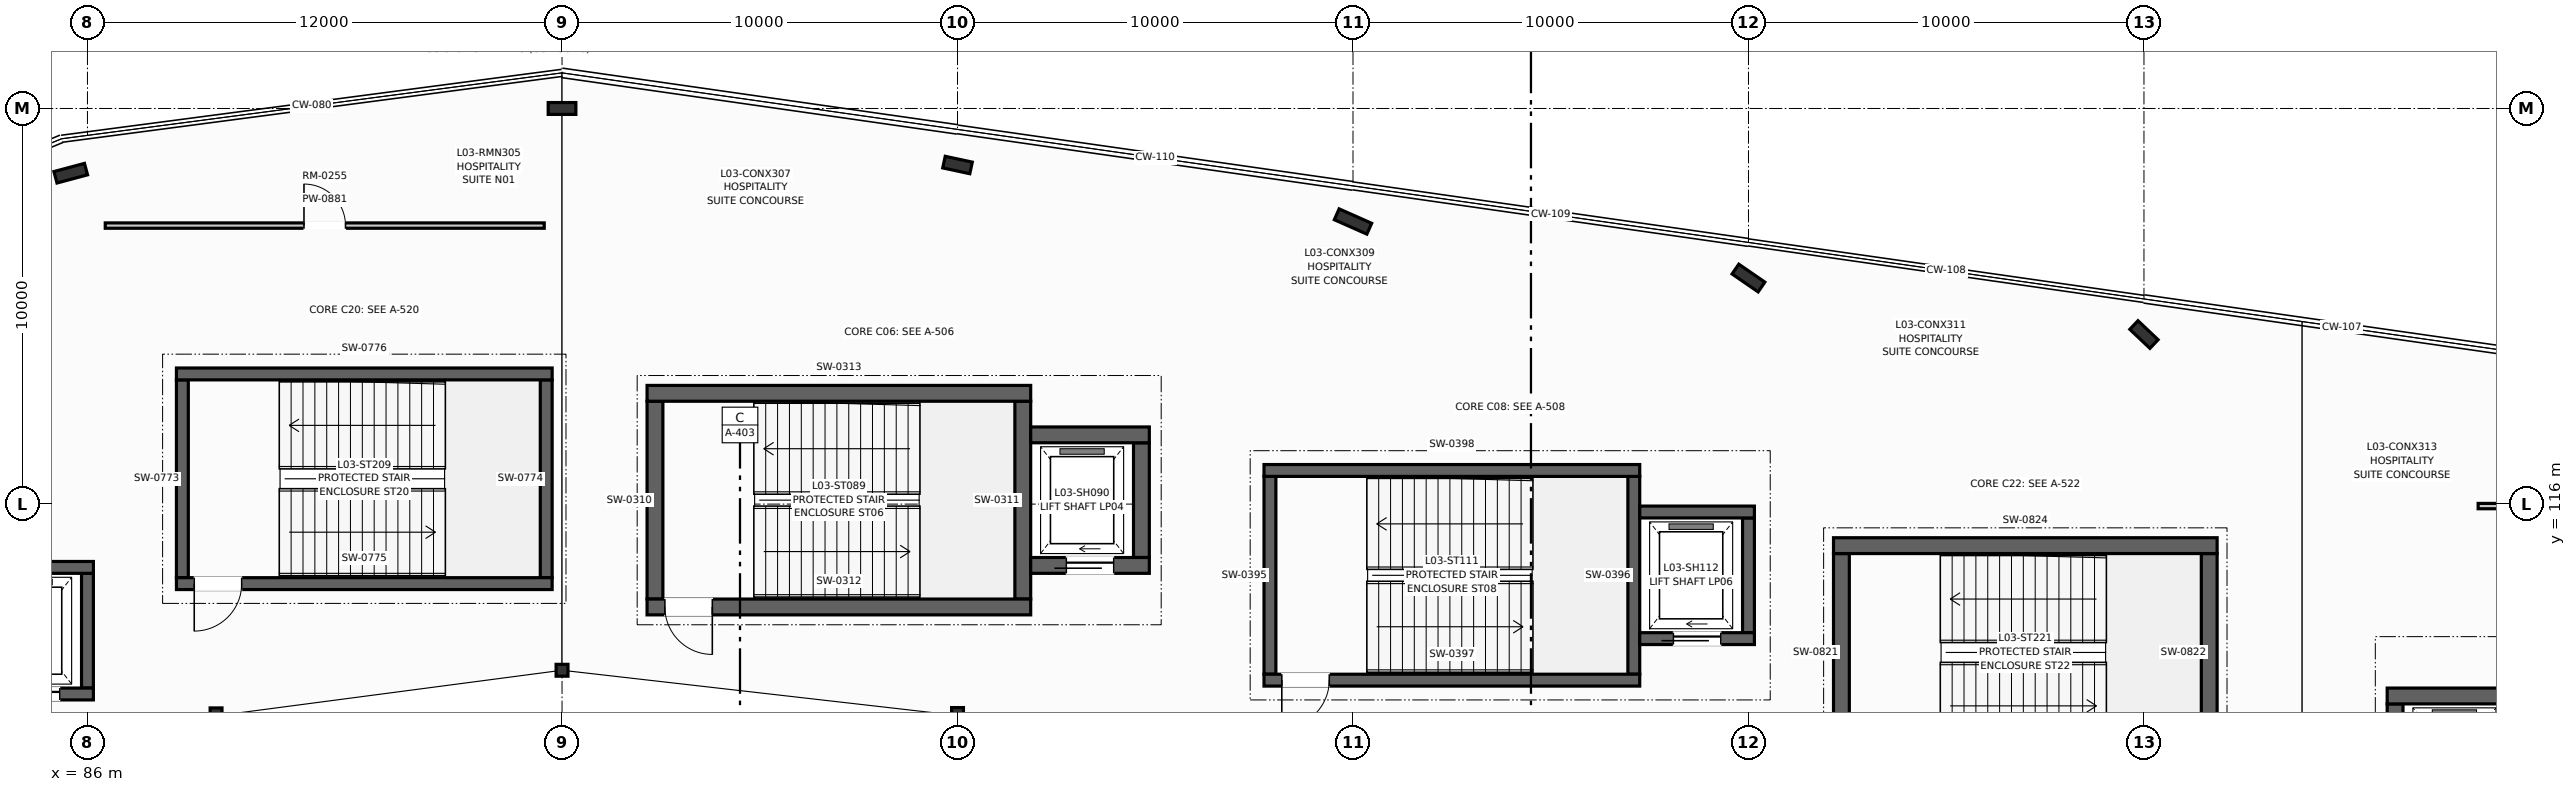
"""IFC4 building model, lengths in metres.
Left out: names, types, materials, properties, quantities, classifications, styles, units other than length and angle.
Written with IfcOpenShell. Run it as: python <this file> out.ifc"""

import sys

from ifc_helpers import new_model, si_unit, direction, frame, frame_2d, origin, origin_2d, place, context, subcontext, project, spatial, rectangle, i_section, extrude, element, fill, save


model = new_model("IFC4")
c1 = context("Model", 3, precision=1e-05, world=origin(), true_north=direction((0.0, 1.0)))
c2 = subcontext(c1, "Body", "Model", "MODEL_VIEW")
j1 = project(units=[si_unit("LENGTHUNIT", "METRE"), si_unit("PLANEANGLEUNIT", "RADIAN")], contexts=[c1])
p1 = place(None, origin())
s1 = spatial("IfcSite", under=j1, at=p1, CompositionType="ELEMENT")
p2 = place(p1, origin())
s2 = spatial("IfcBuilding", under=s1, at=p2, CompositionType="ELEMENT")
p3 = place(p2, frame((0.0, 0.0, 13.5)))
s3 = spatial("IfcBuildingStorey", under=s2, at=p3, CompositionType="ELEMENT", Elevation=13.5)
p4 = place(p3, frame((98.0, 111.8, 0.0), z_axis=(0.0, 0.0, 1.0), x_axis=(1.0, 0.0, 0.0)))
e1 = element("IfcColumn", 1, at=p4, inside=s3, PredefinedType="COLUMN", context=c2, shape_type="SweptSolid", body=[
    extrude(i_section(OverallWidth=0.3, OverallDepth=0.3, WebThickness=0.011, FlangeThickness=0.019, at=origin_2d()), origin(), (0.0, 0.0, 1.0), 4.5),
])
for number, where, z_axis, x_axis in (
    (2, (89.252, 110.648, 0.0), (0.0, 0.0, 1.0), (1.0, 0.0, 0.0)),
    (3, (108.0, 110.657, 0.0), (0.0, 0.0, 1.0), (1.0, 0.0, 0.0)),
):
    element("IfcColumn", number, at=place(p3, frame(where, z_axis=z_axis, x_axis=x_axis)), inside=s3, PredefinedType="COLUMN", context=c2, shape_type="SweptSolid", body=[
        extrude(i_section(OverallWidth=0.3, OverallDepth=0.4, WebThickness=0.013, FlangeThickness=0.024, at=origin_2d()), origin(), (0.0, 0.0, 1.0), 4.5),
    ])
p5 = place(p3, frame((98.0, 126.0, 0.0), z_axis=(0.0, 0.0, 1.0), x_axis=(0.0, 1.0, 0.0)))
e4 = element("IfcColumn", 4, at=p5, inside=s3, PredefinedType="COLUMN", context=c2, shape_type="SweptSolid", body=[
    extrude(i_section(OverallWidth=0.3, OverallDepth=0.7, WebThickness=0.017, FlangeThickness=0.032, at=origin_2d()), origin(), (0.0, 0.0, 1.0), 4.5),
])
p6 = place(p3, frame((85.577, 124.364, 0.0), z_axis=(0.0, 0.0, 1.0), x_axis=(-0.258819045103, 0.965925826289, 0.0)))
e5 = element("IfcColumn", 5, at=p6, inside=s3, PredefinedType="COLUMN", context=c2, shape_type="SweptSolid", body=[
    extrude(i_section(OverallWidth=0.3, OverallDepth=0.8, WebThickness=0.018, FlangeThickness=0.033, at=origin_2d()), origin(), (0.0, 0.0, 1.0), 4.5),
])
p7 = place(p3, frame((138.0, 120.286, 0.0), z_axis=(0.0, 0.0, 1.0), x_axis=(0.687087510804, 0.726574670971, 0.0)))
e6 = element("IfcColumn", 6, at=p7, inside=s3, PredefinedType="COLUMN", context=c2, shape_type="SweptSolid", body=[
    extrude(i_section(OverallWidth=0.3, OverallDepth=0.7, WebThickness=0.017, FlangeThickness=0.032, at=origin_2d()), origin(), (0.0, 0.0, 1.0), 4.5),
])
p8 = place(p3, frame((128.0, 121.714, 0.0), z_axis=(0.0, 0.0, 1.0), x_axis=(0.566406236925, 0.824126188622, 0.0)))
e7 = element("IfcColumn", 7, at=p8, inside=s3, PredefinedType="COLUMN", context=c2, shape_type="SweptSolid", body=[
    extrude(i_section(OverallWidth=0.3, OverallDepth=0.8, WebThickness=0.018, FlangeThickness=0.033, at=origin_2d()), origin(), (0.0, 0.0, 1.0), 4.5),
])
p9 = place(p3, frame((118.0, 123.143, 0.0), z_axis=(0.0, 0.0, 1.0), x_axis=(0.40514158678, 0.914253955234, 0.0)))
e8 = element("IfcColumn", 8, at=p9, inside=s3, PredefinedType="COLUMN", context=c2, shape_type="SweptSolid", body=[
    extrude(i_section(OverallWidth=0.3, OverallDepth=0.9, WebThickness=0.019, FlangeThickness=0.035, at=origin_2d()), origin(), (0.0, 0.0, 1.0), 4.5),
])
p10 = place(p3, frame((108.0, 124.571, 0.0), z_axis=(0.0, 0.0, 1.0), x_axis=(0.209618562904, 0.977783236759, 0.0)))
e9 = element("IfcColumn", 9, at=p10, inside=s3, PredefinedType="COLUMN", context=c2, shape_type="SweptSolid", body=[
    extrude(i_section(OverallWidth=0.3, OverallDepth=0.7, WebThickness=0.017, FlangeThickness=0.032, at=origin_2d()), origin(), (0.0, 0.0, 1.0), 4.5),
])
p11 = place(p3, frame((86.0, 111.35, 0.0), z_axis=(0.0, 0.0, 1.0), x_axis=(0.0, 1.0, 0.0)))
e10 = element("IfcWall", 10, at=p11, inside=s3, PredefinedType="SHEAR", context=c2, shape_type="SweptSolid", body=[
    extrude(rectangle(XDim=2.9, YDim=0.3, at=frame_2d((1.45, 0.0))), origin(), (0.0, 0.0, 1.0), 4.25),
])
p12 = place(p3, frame((83.25, 111.2, 0.0), z_axis=(0.0, 0.0, 1.0), x_axis=(1.0, 0.0, 0.0)))
e11 = element("IfcWall", 11, at=p12, inside=s3, PredefinedType="SHEAR", context=c2, shape_type="SweptSolid", body=[
    extrude(rectangle(XDim=2.9, YDim=0.3, at=frame_2d((1.45, 0.0))), origin(), (0.0, 0.0, 1.0), 4.25),
])
p13 = place(p12, frame((0.85, 0.0, 0.0)))
e12 = element("IfcOpeningElement", 12, at=p13, cuts=e11, PredefinedType="OPENING", context=c2, shape_type="SweptSolid", body=[
    extrude(rectangle(XDim=1.2, YDim=2.2, at=frame_2d((0.6, 1.1))), frame((0.0, 0.16, 0.0), z_axis=(0.0, -1.0, 0.0), x_axis=(1.0, 0.0, 0.0)), (0.0, 0.0, 1.0), 0.32),
])
p14 = place(p3, frame((83.25, 114.4, 0.0), z_axis=(0.0, 0.0, 1.0), x_axis=(1.0, 0.0, 0.0)))
e13 = element("IfcWall", 13, at=p14, inside=s3, PredefinedType="SHEAR", context=c2, shape_type="SweptSolid", body=[
    extrude(rectangle(XDim=2.9, YDim=0.3, at=frame_2d((1.45, 0.0))), origin(), (0.0, 0.0, 1.0), 4.25),
])
for number, where, z_axis, x_axis in (
    (14, (100.35, 113.6, 0.0), (0.0, 0.0, 1.0), (0.0, 1.0, 0.0)),
    (15, (109.65, 113.6, 0.0), (0.0, 0.0, 1.0), (0.0, 1.0, 0.0)),
):
    element("IfcWall", number, at=place(p3, frame(where, z_axis=z_axis, x_axis=x_axis)), inside=s3, PredefinedType="SHEAR", context=c2, shape_type="SweptSolid", body=[
        extrude(rectangle(XDim=5.0, YDim=0.4, at=frame_2d((2.5, 0.0))), origin(), (0.0, 0.0, 1.0), 4.25),
    ])
p15 = place(p3, frame((100.15, 113.4, 0.0), z_axis=(0.0, 0.0, 1.0), x_axis=(1.0, 0.0, 0.0)))
e16 = element("IfcWall", 16, at=p15, inside=s3, PredefinedType="SHEAR", context=c2, shape_type="SweptSolid", body=[
    extrude(rectangle(XDim=9.7, YDim=0.4, at=frame_2d((4.85, 0.0))), origin(), (0.0, 0.0, 1.0), 4.25),
])
p16 = place(p15, frame((0.45, 0.0, 0.0)))
e17 = element("IfcOpeningElement", 17, at=p16, cuts=e16, PredefinedType="OPENING", context=c2, shape_type="SweptSolid", body=[
    extrude(rectangle(XDim=1.2, YDim=2.2, at=frame_2d((0.6, 1.1))), frame((0.0, 0.21, 0.0), z_axis=(0.0, -1.0, 0.0), x_axis=(1.0, 0.0, 0.0)), (0.0, 0.0, 1.0), 0.42),
])
p17 = place(p3, frame((100.15, 118.8, 0.0), z_axis=(0.0, 0.0, 1.0), x_axis=(1.0, 0.0, 0.0)))
e18 = element("IfcWall", 18, at=p17, inside=s3, PredefinedType="SHEAR", context=c2, shape_type="SweptSolid", body=[
    extrude(rectangle(XDim=9.7, YDim=0.4, at=frame_2d((4.85, 0.0))), origin(), (0.0, 0.0, 1.0), 4.25),
])
p18 = place(p3, frame((112.65, 114.65, 0.0), z_axis=(0.0, 0.0, 1.0), x_axis=(0.0, 1.0, 0.0)))
e19 = element("IfcWall", 19, at=p18, inside=s3, PredefinedType="SHEAR", context=c2, shape_type="SweptSolid", body=[
    extrude(rectangle(XDim=2.9, YDim=0.4, at=frame_2d((1.45, 0.0))), origin(), (0.0, 0.0, 1.0), 4.25),
])
p19 = place(p3, frame((109.85, 114.45, 0.0), z_axis=(0.0, 0.0, 1.0), x_axis=(1.0, 0.0, 0.0)))
e20 = element("IfcWall", 20, at=p19, inside=s3, PredefinedType="SHEAR", context=c2, shape_type="SweptSolid", body=[
    extrude(rectangle(XDim=3.0, YDim=0.4, at=frame_2d((1.5, 0.0))), origin(), (0.0, 0.0, 1.0), 4.25),
])
p20 = place(p19, frame((0.9, 0.0, 0.0)))
e21 = element("IfcOpeningElement", 21, at=p20, cuts=e20, PredefinedType="OPENING", context=c2, shape_type="SweptSolid", body=[
    extrude(rectangle(XDim=1.2, YDim=2.2, at=frame_2d((0.6, 1.1))), frame((0.0, 0.21, 0.0), z_axis=(0.0, -1.0, 0.0), x_axis=(1.0, 0.0, 0.0)), (0.0, 0.0, 1.0), 0.42),
])
p21 = place(p3, frame((109.85, 117.75, 0.0), z_axis=(0.0, 0.0, 1.0), x_axis=(1.0, 0.0, 0.0)))
e22 = element("IfcWall", 22, at=p21, inside=s3, PredefinedType="SHEAR", context=c2, shape_type="SweptSolid", body=[
    extrude(rectangle(XDim=3.0, YDim=0.4, at=frame_2d((1.5, 0.0))), origin(), (0.0, 0.0, 1.0), 4.25),
])
for number, where, z_axis, x_axis in (
    (23, (115.9, 111.7, 0.0), (0.0, 0.0, 1.0), (0.0, 1.0, 0.0)),
    (24, (125.1, 111.7, 0.0), (0.0, 0.0, 1.0), (0.0, 1.0, 0.0)),
):
    element("IfcWall", number, at=place(p3, frame(where, z_axis=z_axis, x_axis=x_axis)), inside=s3, PredefinedType="SHEAR", context=c2, shape_type="SweptSolid", body=[
        extrude(rectangle(XDim=5.0, YDim=0.3, at=frame_2d((2.5, 0.0))), origin(), (0.0, 0.0, 1.0), 4.25),
    ])
p22 = place(p3, frame((115.75, 111.55, 0.0), z_axis=(0.0, 0.0, 1.0), x_axis=(1.0, 0.0, 0.0)))
e25 = element("IfcWall", 25, at=p22, inside=s3, PredefinedType="SHEAR", context=c2, shape_type="SweptSolid", body=[
    extrude(rectangle(XDim=9.5, YDim=0.3, at=frame_2d((4.75, 0.0))), origin(), (0.0, 0.0, 1.0), 4.25),
])
p23 = place(p22, frame((0.45, 0.0, 0.0)))
e26 = element("IfcOpeningElement", 26, at=p23, cuts=e25, PredefinedType="OPENING", context=c2, shape_type="SweptSolid", body=[
    extrude(rectangle(XDim=1.2, YDim=2.2, at=frame_2d((0.6, 1.1))), frame((0.0, 0.16, 0.0), z_axis=(0.0, -1.0, 0.0), x_axis=(1.0, 0.0, 0.0)), (0.0, 0.0, 1.0), 0.32),
])
p24 = place(p3, frame((115.75, 116.85, 0.0), z_axis=(0.0, 0.0, 1.0), x_axis=(1.0, 0.0, 0.0)))
e27 = element("IfcWall", 27, at=p24, inside=s3, PredefinedType="SHEAR", context=c2, shape_type="SweptSolid", body=[
    extrude(rectangle(XDim=9.5, YDim=0.3, at=frame_2d((4.75, 0.0))), origin(), (0.0, 0.0, 1.0), 4.25),
])
p25 = place(p3, frame((128.0, 112.75, 0.0), z_axis=(0.0, 0.0, 1.0), x_axis=(0.0, 1.0, 0.0)))
e28 = element("IfcWall", 28, at=p25, inside=s3, PredefinedType="SHEAR", context=c2, shape_type="SweptSolid", body=[
    extrude(rectangle(XDim=2.9, YDim=0.3, at=frame_2d((1.45, 0.0))), origin(), (0.0, 0.0, 1.0), 4.25),
])
p26 = place(p3, frame((125.25, 112.6, 0.0), z_axis=(0.0, 0.0, 1.0), x_axis=(1.0, 0.0, 0.0)))
e29 = element("IfcWall", 29, at=p26, inside=s3, PredefinedType="SHEAR", context=c2, shape_type="SweptSolid", body=[
    extrude(rectangle(XDim=2.9, YDim=0.3, at=frame_2d((1.45, 0.0))), origin(), (0.0, 0.0, 1.0), 4.25),
])
p27 = place(p26, frame((0.85, 0.0, 0.0)))
e30 = element("IfcOpeningElement", 30, at=p27, cuts=e29, PredefinedType="OPENING", context=c2, shape_type="SweptSolid", body=[
    extrude(rectangle(XDim=1.2, YDim=2.2, at=frame_2d((0.6, 1.1))), frame((0.0, 0.16, 0.0), z_axis=(0.0, -1.0, 0.0), x_axis=(1.0, 0.0, 0.0)), (0.0, 0.0, 1.0), 0.32),
])
p28 = place(p3, frame((125.25, 115.8, 0.0), z_axis=(0.0, 0.0, 1.0), x_axis=(1.0, 0.0, 0.0)))
e31 = element("IfcWall", 31, at=p28, inside=s3, PredefinedType="SHEAR", context=c2, shape_type="SweptSolid", body=[
    extrude(rectangle(XDim=2.9, YDim=0.3, at=frame_2d((1.45, 0.0))), origin(), (0.0, 0.0, 1.0), 4.25),
])
p29 = place(p3, frame((144.35, 108.05, 0.0), z_axis=(0.0, 0.0, 1.0), x_axis=(0.0, 1.0, 0.0)))
e32 = element("IfcWall", 32, at=p29, inside=s3, PredefinedType="SHEAR", context=c2, shape_type="SweptSolid", body=[
    extrude(rectangle(XDim=2.9, YDim=0.4, at=frame_2d((1.45, 0.0))), origin(), (0.0, 0.0, 1.0), 4.25),
])
p30 = place(p3, frame((144.15, 111.15, 0.0), z_axis=(0.0, 0.0, 1.0), x_axis=(1.0, 0.0, 0.0)))
e33 = element("IfcWall", 33, at=p30, inside=s3, PredefinedType="SHEAR", context=c2, shape_type="SweptSolid", body=[
    extrude(rectangle(XDim=3.0, YDim=0.4, at=frame_2d((1.5, 0.0))), origin(), (0.0, 0.0, 1.0), 4.25),
])
for number, where, z_axis, x_axis in (
    (34, (88.4, 114.14, 0.0), (0.0, 0.0, 1.0), (0.0, 1.0, 0.0)),
    (35, (97.6, 114.14, 0.0), (0.0, 0.0, 1.0), (0.0, 1.0, 0.0)),
):
    element("IfcWall", number, at=place(p3, frame(where, z_axis=z_axis, x_axis=x_axis)), inside=s3, PredefinedType="SHEAR", context=c2, shape_type="SweptSolid", body=[
        extrude(rectangle(XDim=5.0, YDim=0.3, at=frame_2d((2.5, 0.0))), origin(), (0.0, 0.0, 1.0), 4.25),
    ])
p31 = place(p3, frame((88.25, 113.99, 0.0), z_axis=(0.0, 0.0, 1.0), x_axis=(1.0, 0.0, 0.0)))
e36 = element("IfcWall", 36, at=p31, inside=s3, PredefinedType="SHEAR", context=c2, shape_type="SweptSolid", body=[
    extrude(rectangle(XDim=9.5, YDim=0.3, at=frame_2d((4.75, 0.0))), origin(), (0.0, 0.0, 1.0), 4.25),
])
p32 = place(p31, frame((0.45, 0.0, 0.0)))
e37 = element("IfcOpeningElement", 37, at=p32, cuts=e36, PredefinedType="OPENING", context=c2, shape_type="SweptSolid", body=[
    extrude(rectangle(XDim=1.2, YDim=2.2, at=frame_2d((0.6, 1.1))), frame((0.0, 0.16, 0.0), z_axis=(0.0, -1.0, 0.0), x_axis=(1.0, 0.0, 0.0)), (0.0, 0.0, 1.0), 0.32),
])
p33 = place(p3, frame((88.25, 119.29, 0.0), z_axis=(0.0, 0.0, 1.0), x_axis=(1.0, 0.0, 0.0)))
e38 = element("IfcWall", 38, at=p33, inside=s3, PredefinedType="SHEAR", context=c2, shape_type="SweptSolid", body=[
    extrude(rectangle(XDim=9.5, YDim=0.3, at=frame_2d((4.75, 0.0))), origin(), (0.0, 0.0, 1.0), 4.25),
])
for number, where, z_axis, x_axis in (
    (39, (130.35, 109.75, 0.0), (0.0, 0.0, 1.0), (0.0, 1.0, 0.0)),
    (40, (139.65, 109.75, 0.0), (0.0, 0.0, 1.0), (0.0, 1.0, 0.0)),
):
    element("IfcWall", number, at=place(p3, frame(where, z_axis=z_axis, x_axis=x_axis)), inside=s3, PredefinedType="SHEAR", context=c2, shape_type="SweptSolid", body=[
        extrude(rectangle(XDim=5.0, YDim=0.4, at=frame_2d((2.5, 0.0))), origin(), (0.0, 0.0, 1.0), 4.25),
    ])
p34 = place(p3, frame((130.15, 114.95, 0.0), z_axis=(0.0, 0.0, 1.0), x_axis=(1.0, 0.0, 0.0)))
e41 = element("IfcWall", 41, at=p34, inside=s3, PredefinedType="SHEAR", context=c2, shape_type="SweptSolid", body=[
    extrude(rectangle(XDim=9.7, YDim=0.4, at=frame_2d((4.85, 0.0))), origin(), (0.0, 0.0, 1.0), 4.25),
])
p35 = place(p3, frame((86.45, 123.04, 0.0), z_axis=(0.0, 0.0, 1.0), x_axis=(1.0, 0.0, 0.0)))
e42 = element("IfcWall", 42, at=p35, inside=s3, PredefinedType="PARTITIONING", context=c2, shape_type="SweptSolid", body=[
    extrude(rectangle(XDim=11.1, YDim=0.135, at=frame_2d((5.55, 0.0))), origin(), (0.0, 0.0, 1.0), 3.22),
])
p36 = place(p35, frame((5.025, 0.0, 0.0)))
e43 = element("IfcOpeningElement", 43, at=p36, cuts=e42, PredefinedType="OPENING", context=c2, shape_type="SweptSolid", body=[
    extrude(rectangle(XDim=1.05, YDim=2.15, at=frame_2d((0.525, 1.075))), frame((0.0, 0.077, 0.0), z_axis=(0.0, -1.0, 0.0), x_axis=(1.0, 0.0, 0.0)), (0.0, 0.0, 1.0), 0.155),
])
p37 = place(p3, frame((146.45, 115.95, 0.0), z_axis=(0.0, 0.0, 1.0), x_axis=(1.0, 0.0, 0.0)))
e44 = element("IfcWall", 44, at=p37, inside=s3, PredefinedType="PARTITIONING", context=c2, shape_type="SweptSolid", body=[
    extrude(rectangle(XDim=11.1, YDim=0.135, at=frame_2d((5.55, 0.0))), origin(), (0.0, 0.0, 1.0), 3.22),
])
p38 = place(p37, frame((5.025, 0.0, 0.0)))
e45 = element("IfcOpeningElement", 45, at=p38, cuts=e44, PredefinedType="OPENING", context=c2, shape_type="SweptSolid", body=[
    extrude(rectangle(XDim=1.05, YDim=2.15, at=frame_2d((0.525, 1.075))), frame((0.0, 0.077, 0.0), z_axis=(0.0, -1.0, 0.0), x_axis=(1.0, 0.0, 0.0)), (0.0, 0.0, 1.0), 0.155),
])
p39 = place(p13, origin())
e46 = element("IfcDoor", 46, at=p39, inside=s3, OperationType="SLIDING_TO_LEFT", PredefinedType="DOOR", context=c2, shape_type="SweptSolid", body=[
    extrude(rectangle(XDim=1.2, YDim=2.2, at=frame_2d((0.6, 1.1))), frame((0.0, 0.025, 0.0), z_axis=(0.0, -1.0, 0.0), x_axis=(1.0, 0.0, 0.0)), (0.0, 0.0, 1.0), 0.05),
])
fill(e12, e46)
p40 = place(p16, frame((1.2, 0.0, 0.0), z_axis=(0.0, 0.0, 1.0), x_axis=(-1.0, 0.0, 0.0)))
e47 = element("IfcDoor", 47, at=p40, inside=s3, OperationType="SINGLE_SWING_RIGHT", PredefinedType="DOOR", context=c2, shape_type="SweptSolid", body=[
    extrude(rectangle(XDim=1.2, YDim=2.2, at=frame_2d((0.6, 1.1))), frame((0.0, 0.025, 0.0), z_axis=(0.0, -1.0, 0.0), x_axis=(1.0, 0.0, 0.0)), (0.0, 0.0, 1.0), 0.05),
])
fill(e17, e47)
p41 = place(p20, origin())
e48 = element("IfcDoor", 48, at=p41, inside=s3, OperationType="SLIDING_TO_LEFT", PredefinedType="DOOR", context=c2, shape_type="SweptSolid", body=[
    extrude(rectangle(XDim=1.2, YDim=2.2, at=frame_2d((0.6, 1.1))), frame((0.0, 0.025, 0.0), z_axis=(0.0, -1.0, 0.0), x_axis=(1.0, 0.0, 0.0)), (0.0, 0.0, 1.0), 0.05),
])
fill(e21, e48)
p42 = place(p23, frame((1.2, 0.0, 0.0), z_axis=(0.0, 0.0, 1.0), x_axis=(-1.0, 0.0, 0.0)))
e49 = element("IfcDoor", 49, at=p42, inside=s3, OperationType="SINGLE_SWING_LEFT", PredefinedType="DOOR", context=c2, shape_type="SweptSolid", body=[
    extrude(rectangle(XDim=1.2, YDim=2.2, at=frame_2d((0.6, 1.1))), frame((0.0, 0.025, 0.0), z_axis=(0.0, -1.0, 0.0), x_axis=(1.0, 0.0, 0.0)), (0.0, 0.0, 1.0), 0.05),
])
fill(e26, e49)
p43 = place(p27, origin())
e50 = element("IfcDoor", 50, at=p43, inside=s3, OperationType="SLIDING_TO_LEFT", PredefinedType="DOOR", context=c2, shape_type="SweptSolid", body=[
    extrude(rectangle(XDim=1.2, YDim=2.2, at=frame_2d((0.6, 1.1))), frame((0.0, 0.025, 0.0), z_axis=(0.0, -1.0, 0.0), x_axis=(1.0, 0.0, 0.0)), (0.0, 0.0, 1.0), 0.05),
])
fill(e30, e50)
p44 = place(p32, frame((1.2, 0.0, 0.0), z_axis=(0.0, 0.0, 1.0), x_axis=(-1.0, 0.0, 0.0)))
e51 = element("IfcDoor", 51, at=p44, inside=s3, OperationType="SINGLE_SWING_LEFT", PredefinedType="DOOR", context=c2, shape_type="SweptSolid", body=[
    extrude(rectangle(XDim=1.2, YDim=2.2, at=frame_2d((0.6, 1.1))), frame((0.0, 0.025, 0.0), z_axis=(0.0, -1.0, 0.0), x_axis=(1.0, 0.0, 0.0)), (0.0, 0.0, 1.0), 0.05),
])
fill(e37, e51)
p45 = place(p36, origin())
e52 = element("IfcDoor", 52, at=p45, inside=s3, OperationType="SINGLE_SWING_LEFT", PredefinedType="DOOR", context=c2, shape_type="SweptSolid", body=[
    extrude(rectangle(XDim=1.05, YDim=2.15, at=frame_2d((0.525, 1.075))), frame((0.0, 0.025, 0.0), z_axis=(0.0, -1.0, 0.0), x_axis=(1.0, 0.0, 0.0)), (0.0, 0.0, 1.0), 0.05),
])
fill(e43, e52)
save(model, sys.argv[1])
